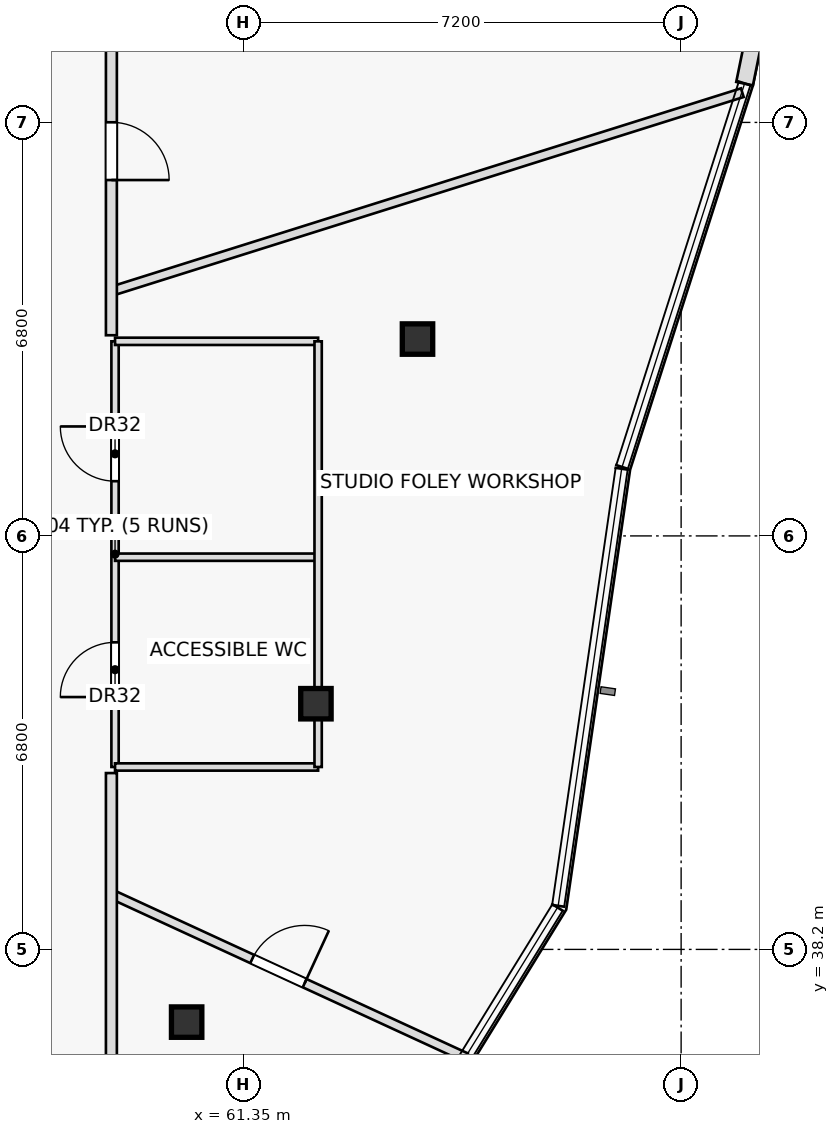
"""IFC4 building model, lengths in metres.
Left out: names, types, materials, properties, quantities, classifications, styles, units other than length and angle.
Written with IfcOpenShell. Run it as: python <this file> out.ifc"""

import sys

from ifc_helpers import new_model, si_unit, direction, frame, frame_2d, origin, origin_2d, place, context, subcontext, project, spatial, rectangle, hollow_rectangle, extrude, element, fill, save


model = new_model("IFC4")
c1 = context("Model", 3, precision=1e-05, world=origin(), true_north=direction((0.0, 1.0)))
c2 = subcontext(c1, "Body", "Model", "MODEL_VIEW")
j1 = project(units=[si_unit("LENGTHUNIT", "METRE"), si_unit("PLANEANGLEUNIT", "RADIAN")], contexts=[c1])
p1 = place(None, origin())
s1 = spatial("IfcSite", under=j1, at=p1, CompositionType="ELEMENT")
p2 = place(p1, origin())
s2 = spatial("IfcBuilding", under=s1, at=p2, CompositionType="ELEMENT")
p3 = place(p2, frame((0.0, 0.0, 273.5)))
s3 = spatial("IfcBuildingStorey", under=s2, at=p3, CompositionType="ELEMENT", Elevation=273.5)
for number, where, z_axis, x_axis in (
    (1, (60.417, 37.004, 0.0), (0.0, 0.0, 1.0), (1.0, 0.0, 0.0)),
    (2, (62.544, 42.24, 0.0), (0.0, 0.0, 1.0), (1.0, 0.0, 0.0)),
    (3, (64.214, 48.237, 0.0), (0.0, 0.0, 1.0), (1.0, 0.0, 0.0)),
):
    element("IfcColumn", number, at=place(p3, frame(where, z_axis=z_axis, x_axis=x_axis)), inside=s3, PredefinedType="COLUMN", context=c2, shape_type="SweptSolid", body=[
        extrude(hollow_rectangle(XDim=0.5, YDim=0.5, WallThickness=0.03, at=origin_2d()), origin(), (0.0, 0.0, 1.0), 3.7),
    ])
p4 = place(p3, frame((59.24, 41.2, 0.0), z_axis=(0.0, 0.0, 1.0), x_axis=(0.0, 1.0, 0.0)))
e4 = element("IfcWall", 4, at=p4, inside=s3, PredefinedType="PARTITIONING", context=c2, shape_type="SweptSolid", body=[
    extrude(rectangle(XDim=7.0, YDim=0.12, at=frame_2d((3.5, 0.0))), origin(), (0.0, 0.0, 1.0), 3.7),
])
p5 = place(p4, frame((1.15, 0.0, 0.0)))
e5 = element("IfcOpeningElement", 5, at=p5, cuts=e4, PredefinedType="OPENING", context=c2, shape_type="SweptSolid", body=[
    extrude(rectangle(XDim=0.9, YDim=2.05, at=frame_2d((0.45, 1.025))), frame((0.0, 0.07, 0.0), z_axis=(0.0, -1.0, 0.0), x_axis=(1.0, 0.0, 0.0)), (0.0, 0.0, 1.0), 0.14),
])
p6 = place(p4, frame((4.7, 0.0, 0.0)))
e6 = element("IfcOpeningElement", 6, at=p6, cuts=e4, PredefinedType="OPENING", context=c2, shape_type="SweptSolid", body=[
    extrude(rectangle(XDim=0.9, YDim=2.05, at=frame_2d((0.45, 1.025))), frame((0.0, 0.07, 0.0), z_axis=(0.0, -1.0, 0.0), x_axis=(1.0, 0.0, 0.0)), (0.0, 0.0, 1.0), 0.14),
])
p7 = place(p3, frame((59.24, 41.2, 0.0), z_axis=(0.0, 0.0, 1.0), x_axis=(1.0, 0.0, 0.0)))
e7 = element("IfcWall", 7, at=p7, inside=s3, PredefinedType="PARTITIONING", context=c2, shape_type="SweptSolid", body=[
    extrude(rectangle(XDim=3.34, YDim=0.12, at=frame_2d((1.67, 0.0))), origin(), (0.0, 0.0, 1.0), 3.175),
])
for number, where, z_axis, x_axis in (
    (8, (59.24, 44.65, 0.0), (0.0, 0.0, 1.0), (1.0, 0.0, 0.0)),
    (9, (59.24, 48.2, 0.0), (0.0, 0.0, 1.0), (1.0, 0.0, 0.0)),
):
    element("IfcWall", number, at=place(p3, frame(where, z_axis=z_axis, x_axis=x_axis)), inside=s3, PredefinedType="PARTITIONING", context=c2, shape_type="SweptSolid", body=[
        extrude(rectangle(XDim=3.34, YDim=0.12, at=frame_2d((1.67, 0.0))), origin(), (0.0, 0.0, 1.0), 3.7),
    ])
p8 = place(p3, frame((62.58, 41.2, 0.0), z_axis=(0.0, 0.0, 1.0), x_axis=(0.0, 1.0, 0.0)))
e10 = element("IfcWall", 10, at=p8, inside=s3, PredefinedType="PARTITIONING", context=c2, shape_type="SweptSolid", body=[
    extrude(rectangle(XDim=7.0, YDim=0.12, at=frame_2d((3.5, 0.0))), origin(), (0.0, 0.0, 1.0), 3.235),
])
p9 = place(p3, frame((59.18, 39.11, 0.0), z_axis=(0.0, 0.0, 1.0), x_axis=(0.908182970633, -0.418573400794, 0.0)))
e11 = element("IfcWall", 11, at=p9, inside=s3, PredefinedType="PARTITIONING", context=c2, shape_type="SweptSolid", body=[
    extrude(rectangle(XDim=6.42, YDim=0.15, at=frame_2d((3.21, 0.0))), origin(), (0.0, 0.0, 1.0), 3.235),
])
p10 = place(p9, frame((2.55, 0.0, 0.0)))
e12 = element("IfcOpeningElement", 12, at=p10, cuts=e11, PredefinedType="OPENING", context=c2, shape_type="SweptSolid", body=[
    extrude(rectangle(XDim=0.95, YDim=2.05, at=frame_2d((0.475, 1.025))), frame((0.0, 0.085, 0.0), z_axis=(0.0, -1.0, 0.0), x_axis=(1.0, 0.0, 0.0)), (0.0, 0.0, 1.0), 0.17),
])
p11 = place(p3, frame((59.18, 49.023, 0.0), z_axis=(0.0, 0.0, 1.0), x_axis=(0.953863772669, 0.300239742854, 0.0)))
e13 = element("IfcWall", 13, at=p11, inside=s3, PredefinedType="PARTITIONING", context=c2, shape_type="SweptSolid", body=[
    extrude(rectangle(XDim=10.878, YDim=0.15, at=frame_2d((5.439, 0.0))), origin(), (0.0, 0.0, 1.0), 3.175),
])
p12 = place(p3, frame((59.18, 53.83, 0.0), z_axis=(0.0, 0.0, 1.0), x_axis=(0.0, -1.0, 0.0)))
e14 = element("IfcWall", 14, at=p12, inside=s3, PredefinedType="PARTITIONING", context=c2, shape_type="SweptSolid", body=[
    extrude(rectangle(XDim=5.53, YDim=0.18, at=frame_2d((2.765, 0.0))), origin(), (0.0, 0.0, 1.0), 3.7),
])
p13 = place(p12, frame((2.028, 0.0, 0.0)))
e15 = element("IfcOpeningElement", 15, at=p13, cuts=e14, PredefinedType="OPENING", context=c2, shape_type="SweptSolid", body=[
    extrude(rectangle(XDim=0.95, YDim=2.05, at=frame_2d((0.475, 1.025))), frame((0.0, 0.1, 0.0), z_axis=(0.0, -1.0, 0.0), x_axis=(1.0, 0.0, 0.0)), (0.0, 0.0, 1.0), 0.2),
])
p14 = place(p3, frame((59.18, 41.1, 0.0), z_axis=(0.0, 0.0, 1.0), x_axis=(0.0, -1.0, 0.0)))
e16 = element("IfcWall", 16, at=p14, inside=s3, PredefinedType="PARTITIONING", context=c2, shape_type="SweptSolid", body=[
    extrude(rectangle(XDim=4.93, YDim=0.18, at=frame_2d((2.465, 0.0))), origin(), (0.0, 0.0, 1.0), 3.7),
])
p15 = place(p3, frame((69.594, 52.438, 0.0), z_axis=(0.0, 0.0, 1.0), x_axis=(0.200254120107, 0.979743990734, 0.0)))
e17 = element("IfcWall", 17, at=p15, inside=s3, PredefinedType="STANDARD", context=c2, shape_type="SweptSolid", body=[
    extrude(rectangle(XDim=1.724, YDim=0.28, at=frame_2d((0.862, 0.0))), origin(), (0.0, 0.0, 1.0), 3.7),
])
p16 = place(p5, origin())
e18 = element("IfcDoor", 18, at=p16, inside=s3, OperationType="SINGLE_SWING_LEFT", PredefinedType="DOOR", context=c2, shape_type="SweptSolid", body=[
    extrude(rectangle(XDim=0.9, YDim=2.05, at=frame_2d((0.45, 1.025))), frame((0.0, 0.025, 0.0), z_axis=(0.0, -1.0, 0.0), x_axis=(1.0, 0.0, 0.0)), (0.0, 0.0, 1.0), 0.05),
])
fill(e5, e18)
p17 = place(p6, origin())
e19 = element("IfcDoor", 19, at=p17, inside=s3, OperationType="SINGLE_SWING_RIGHT", PredefinedType="DOOR", context=c2, shape_type="SweptSolid", body=[
    extrude(rectangle(XDim=0.9, YDim=2.05, at=frame_2d((0.45, 1.025))), frame((0.0, 0.025, 0.0), z_axis=(0.0, -1.0, 0.0), x_axis=(1.0, 0.0, 0.0)), (0.0, 0.0, 1.0), 0.05),
])
fill(e6, e19)
p18 = place(p10, origin())
e20 = element("IfcDoor", 20, at=p18, inside=s3, OperationType="SINGLE_SWING_RIGHT", PredefinedType="DOOR", context=c2, shape_type="SweptSolid", body=[
    extrude(rectangle(XDim=0.95, YDim=2.05, at=frame_2d((0.475, 1.025))), frame((0.0, 0.025, 0.0), z_axis=(0.0, -1.0, 0.0), x_axis=(1.0, 0.0, 0.0)), (0.0, 0.0, 1.0), 0.05),
])
fill(e12, e20)
p19 = place(p13, origin())
e21 = element("IfcDoor", 21, at=p19, inside=s3, OperationType="SINGLE_SWING_RIGHT", PredefinedType="DOOR", context=c2, shape_type="SweptSolid", body=[
    extrude(rectangle(XDim=0.95, YDim=2.05, at=frame_2d((0.475, 1.025))), frame((0.0, 0.025, 0.0), z_axis=(0.0, -1.0, 0.0), x_axis=(1.0, 0.0, 0.0)), (0.0, 0.0, 1.0), 0.05),
])
fill(e15, e21)
save(model, sys.argv[1])
